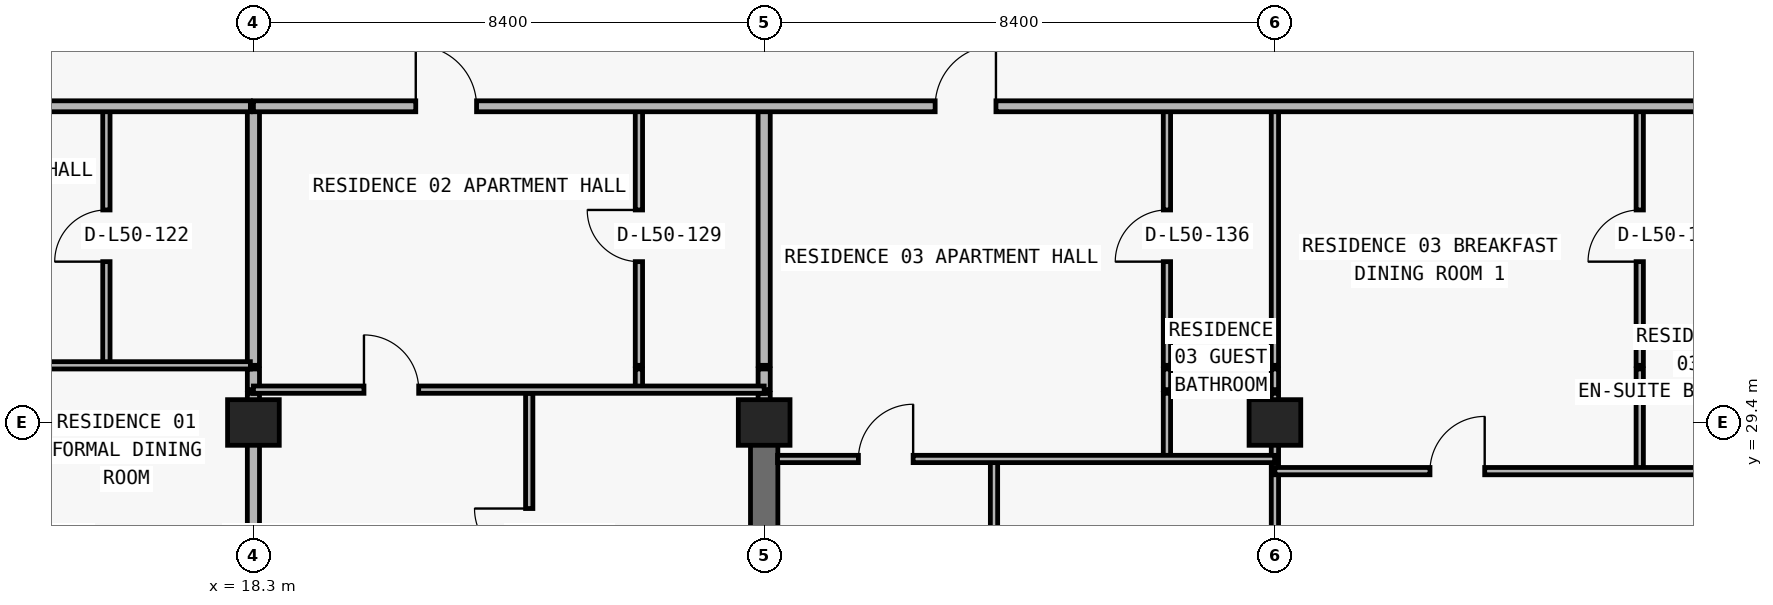
"""IFC4 building model, lengths in metres.
Left out: names, types, materials, properties, quantities, classifications, styles, units other than length and angle.
Written with IfcOpenShell. Run it as: python <this file> out.ifc"""

import sys

from ifc_helpers import new_model, si_unit, direction, frame, frame_2d, origin, origin_2d, place, context, subcontext, project, spatial, rectangle, extrude, element, fill, save


model = new_model("IFC4")
c1 = context("Model", 3, precision=1e-05, world=origin(), true_north=direction((0.0, 1.0)))
c2 = subcontext(c1, "Body", "Model", "MODEL_VIEW")
j1 = project(units=[si_unit("LENGTHUNIT", "METRE"), si_unit("PLANEANGLEUNIT", "RADIAN")], contexts=[c1])
p1 = place(None, origin())
s1 = spatial("IfcSite", under=j1, at=p1, CompositionType="ELEMENT")
p2 = place(p1, origin())
s2 = spatial("IfcBuilding", under=s1, at=p2, CompositionType="ELEMENT")
p3 = place(p2, frame((0.0, 0.0, 180.3)))
s3 = spatial("IfcBuildingStorey", under=s2, at=p3, CompositionType="ELEMENT", Elevation=180.3)
for number, where, z_axis, x_axis in (
    (1, (18.3, 29.4, 0.0), (0.0, 0.0, 1.0), (1.0, 0.0, 0.0)),
    (2, (26.7, 29.4, 0.0), (0.0, 0.0, 1.0), (1.0, 0.0, 0.0)),
    (3, (35.1, 29.4, 0.0), (0.0, 0.0, 1.0), (1.0, 0.0, 0.0)),
):
    element("IfcColumn", number, at=place(p3, frame(where, z_axis=z_axis, x_axis=x_axis)), inside=s3, PredefinedType="COLUMN", context=c2, shape_type="SweptSolid", body=[
        extrude(rectangle(XDim=0.85, YDim=0.75, at=origin_2d()), origin(), (0.0, 0.0, 1.0), 3.0),
    ])
p4 = place(p3, frame((26.7, 20.8, 0.0), z_axis=(0.0, 0.0, 1.0), x_axis=(0.0, 1.0, 0.0)))
e4 = element("IfcWall", 4, at=p4, inside=s3, PredefinedType="SHEAR", context=c2, shape_type="SweptSolid", body=[
    extrude(rectangle(XDim=8.6, YDim=0.45, at=frame_2d((4.3, 0.0))), origin(), (0.0, 0.0, 1.0), 3.0),
])
p5 = place(p3, frame((15.882, 30.34, 0.0), z_axis=(0.0, 0.0, 1.0), x_axis=(0.0, 1.0, 0.0)))
e5 = element("IfcWall", 5, at=p5, inside=s3, PredefinedType="PARTITIONING", context=c2, shape_type="SweptSolid", body=[
    extrude(rectangle(XDim=4.26, YDim=0.12, at=frame_2d((2.13, 0.0))), origin(), (0.0, 0.0, 1.0), 2.675),
])
p6 = place(p5, frame((1.705, 0.0, 0.0)))
e6 = element("IfcOpeningElement", 6, at=p6, cuts=e5, PredefinedType="OPENING", context=c2, shape_type="SweptSolid", body=[
    extrude(rectangle(XDim=0.85, YDim=2.1, at=frame_2d((0.425, 1.05))), frame((0.0, 0.07, 0.0), z_axis=(0.0, -1.0, 0.0), x_axis=(1.0, 0.0, 0.0)), (0.0, 0.0, 1.0), 0.14),
])
p7 = place(p3, frame((18.3, 25.19, 0.0), z_axis=(0.0, 0.0, 1.0), x_axis=(0.0, 1.0, 0.0)))
e7 = element("IfcWall", 7, at=p7, inside=s3, PredefinedType="PARTITIONING", context=c2, shape_type="SweptSolid", body=[
    extrude(rectangle(XDim=4.69, YDim=0.2, at=frame_2d((2.345, 0.0))), origin(), (0.0, 0.0, 1.0), 2.213),
])
p8 = place(p3, frame((18.3, 29.94, 0.0), z_axis=(0.0, 0.0, 1.0), x_axis=(0.0, 1.0, 0.0)))
e8 = element("IfcWall", 8, at=p8, inside=s3, PredefinedType="PARTITIONING", context=c2, shape_type="SweptSolid", body=[
    extrude(rectangle(XDim=0.34, YDim=0.2, at=frame_2d((0.17, 0.0))), origin(), (0.0, 0.0, 1.0), 2.213),
])
p9 = place(p3, frame((18.3, 30.34, 0.0), z_axis=(0.0, 0.0, 1.0), x_axis=(0.0, 1.0, 0.0)))
e9 = element("IfcWall", 9, at=p9, inside=s3, PredefinedType="PARTITIONING", context=c2, shape_type="SweptSolid", body=[
    extrude(rectangle(XDim=4.26, YDim=0.2, at=frame_2d((2.13, 0.0))), origin(), (0.0, 0.0, 1.0), 2.213),
])
p10 = place(p3, frame((22.836, 25.19, 0.0), z_axis=(0.0, 0.0, 1.0), x_axis=(0.0, 1.0, 0.0)))
e10 = element("IfcWall", 10, at=p10, inside=s3, PredefinedType="PARTITIONING", context=c2, shape_type="SweptSolid", body=[
    extrude(rectangle(XDim=4.69, YDim=0.12, at=frame_2d((2.345, 0.0))), origin(), (0.0, 0.0, 1.0), 3.0),
])
p11 = place(p10, frame((1.895, 0.0, 0.0)))
e11 = element("IfcOpeningElement", 11, at=p11, cuts=e10, PredefinedType="OPENING", context=c2, shape_type="SweptSolid", body=[
    extrude(rectangle(XDim=0.9, YDim=2.15, at=frame_2d((0.45, 1.075))), frame((0.0, 0.07, 0.0), z_axis=(0.0, -1.0, 0.0), x_axis=(1.0, 0.0, 0.0)), (0.0, 0.0, 1.0), 0.14),
])
p12 = place(p3, frame((24.64, 29.94, 0.0), z_axis=(0.0, 0.0, 1.0), x_axis=(0.0, 1.0, 0.0)))
e12 = element("IfcWall", 12, at=p12, inside=s3, PredefinedType="PARTITIONING", context=c2, shape_type="SweptSolid", body=[
    extrude(rectangle(XDim=0.34, YDim=0.12, at=frame_2d((0.17, 0.0))), origin(), (0.0, 0.0, 1.0), 3.0),
])
p13 = place(p3, frame((24.64, 30.34, 0.0), z_axis=(0.0, 0.0, 1.0), x_axis=(0.0, 1.0, 0.0)))
e13 = element("IfcWall", 13, at=p13, inside=s3, PredefinedType="PARTITIONING", context=c2, shape_type="SweptSolid", body=[
    extrude(rectangle(XDim=4.26, YDim=0.12, at=frame_2d((2.13, 0.0))), origin(), (0.0, 0.0, 1.0), 3.0),
])
p14 = place(p13, frame((1.705, 0.0, 0.0)))
e14 = element("IfcOpeningElement", 14, at=p14, cuts=e13, PredefinedType="OPENING", context=c2, shape_type="SweptSolid", body=[
    extrude(rectangle(XDim=0.85, YDim=2.1, at=frame_2d((0.425, 1.05))), frame((0.0, 0.07, 0.0), z_axis=(0.0, -1.0, 0.0), x_axis=(1.0, 0.0, 0.0)), (0.0, 0.0, 1.0), 0.14),
])
p15 = place(p3, frame((26.7, 29.405, 0.0), z_axis=(0.0, 0.0, 1.0), x_axis=(0.0, 1.0, 0.0)))
e15 = element("IfcWall", 15, at=p15, inside=s3, PredefinedType="PARTITIONING", context=c2, shape_type="SweptSolid", body=[
    extrude(rectangle(XDim=0.475, YDim=0.2, at=frame_2d((0.237, 0.0))), origin(), (0.0, 0.0, 1.0), 2.285),
])
p16 = place(p3, frame((26.7, 29.94, 0.0), z_axis=(0.0, 0.0, 1.0), x_axis=(0.0, 1.0, 0.0)))
e16 = element("IfcWall", 16, at=p16, inside=s3, PredefinedType="PARTITIONING", context=c2, shape_type="SweptSolid", body=[
    extrude(rectangle(XDim=0.34, YDim=0.2, at=frame_2d((0.17, 0.0))), origin(), (0.0, 0.0, 1.0), 2.285),
])
p17 = place(p3, frame((26.7, 30.34, 0.0), z_axis=(0.0, 0.0, 1.0), x_axis=(0.0, 1.0, 0.0)))
e17 = element("IfcWall", 17, at=p17, inside=s3, PredefinedType="PARTITIONING", context=c2, shape_type="SweptSolid", body=[
    extrude(rectangle(XDim=4.26, YDim=0.2, at=frame_2d((2.13, 0.0))), origin(), (0.0, 0.0, 1.0), 2.285),
])
p18 = place(p3, frame((30.48, 25.19, 0.0), z_axis=(0.0, 0.0, 1.0), x_axis=(0.0, 1.0, 0.0)))
e18 = element("IfcWall", 18, at=p18, inside=s3, PredefinedType="PARTITIONING", context=c2, shape_type="SweptSolid", body=[
    extrude(rectangle(XDim=3.61, YDim=0.12, at=frame_2d((1.805, 0.0))), origin(), (0.0, 0.0, 1.0), 3.0),
])
p19 = place(p18, frame((1.355, 0.0, 0.0)))
e19 = element("IfcOpeningElement", 19, at=p19, cuts=e18, PredefinedType="OPENING", context=c2, shape_type="SweptSolid", body=[
    extrude(rectangle(XDim=0.9, YDim=2.15, at=frame_2d((0.45, 1.075))), frame((0.0, 0.07, 0.0), z_axis=(0.0, -1.0, 0.0), x_axis=(1.0, 0.0, 0.0)), (0.0, 0.0, 1.0), 0.14),
])
p20 = place(p3, frame((33.324, 28.8, 0.0), z_axis=(0.0, 0.0, 1.0), x_axis=(0.0, 1.0, 0.0)))
e20 = element("IfcWall", 20, at=p20, inside=s3, PredefinedType="PARTITIONING", context=c2, shape_type="SweptSolid", body=[
    extrude(rectangle(XDim=1.08, YDim=0.12, at=frame_2d((0.54, 0.0))), origin(), (0.0, 0.0, 1.0), 3.0),
])
p21 = place(p3, frame((33.324, 29.94, 0.0), z_axis=(0.0, 0.0, 1.0), x_axis=(0.0, 1.0, 0.0)))
e21 = element("IfcWall", 21, at=p21, inside=s3, PredefinedType="PARTITIONING", context=c2, shape_type="SweptSolid", body=[
    extrude(rectangle(XDim=0.34, YDim=0.12, at=frame_2d((0.17, 0.0))), origin(), (0.0, 0.0, 1.0), 3.0),
])
p22 = place(p3, frame((33.324, 30.34, 0.0), z_axis=(0.0, 0.0, 1.0), x_axis=(0.0, 1.0, 0.0)))
e22 = element("IfcWall", 22, at=p22, inside=s3, PredefinedType="PARTITIONING", context=c2, shape_type="SweptSolid", body=[
    extrude(rectangle(XDim=4.26, YDim=0.12, at=frame_2d((2.13, 0.0))), origin(), (0.0, 0.0, 1.0), 3.0),
])
p23 = place(p22, frame((1.705, 0.0, 0.0)))
e23 = element("IfcOpeningElement", 23, at=p23, cuts=e22, PredefinedType="OPENING", context=c2, shape_type="SweptSolid", body=[
    extrude(rectangle(XDim=0.85, YDim=2.1, at=frame_2d((0.425, 1.05))), frame((0.0, 0.07, 0.0), z_axis=(0.0, -1.0, 0.0), x_axis=(1.0, 0.0, 0.0)), (0.0, 0.0, 1.0), 0.14),
])
p24 = place(p3, frame((35.1, 25.19, 0.0), z_axis=(0.0, 0.0, 1.0), x_axis=(0.0, 1.0, 0.0)))
e24 = element("IfcWall", 24, at=p24, inside=s3, PredefinedType="PARTITIONING", context=c2, shape_type="SweptSolid", body=[
    extrude(rectangle(XDim=4.69, YDim=0.12, at=frame_2d((2.345, 0.0))), origin(), (0.0, 0.0, 1.0), 2.213),
])
p25 = place(p24, frame((1.255, 0.0, 0.0)))
e25 = element("IfcOpeningElement", 25, at=p25, cuts=e24, PredefinedType="OPENING", context=c2, shape_type="SweptSolid", body=[
    extrude(rectangle(XDim=0.9, YDim=2.15, at=frame_2d((0.45, 1.075))), frame((0.0, 0.07, 0.0), z_axis=(0.0, -1.0, 0.0), x_axis=(1.0, 0.0, 0.0)), (0.0, 0.0, 1.0), 0.14),
])
p26 = place(p3, frame((35.1, 29.94, 0.0), z_axis=(0.0, 0.0, 1.0), x_axis=(0.0, 1.0, 0.0)))
e26 = element("IfcWall", 26, at=p26, inside=s3, PredefinedType="PARTITIONING", context=c2, shape_type="SweptSolid", body=[
    extrude(rectangle(XDim=0.34, YDim=0.12, at=frame_2d((0.17, 0.0))), origin(), (0.0, 0.0, 1.0), 2.213),
])
p27 = place(p3, frame((35.1, 30.34, 0.0), z_axis=(0.0, 0.0, 1.0), x_axis=(0.0, 1.0, 0.0)))
e27 = element("IfcWall", 27, at=p27, inside=s3, PredefinedType="PARTITIONING", context=c2, shape_type="SweptSolid", body=[
    extrude(rectangle(XDim=4.26, YDim=0.12, at=frame_2d((2.13, 0.0))), origin(), (0.0, 0.0, 1.0), 2.213),
])
p28 = place(p3, frame((41.1, 28.6, 0.0), z_axis=(0.0, 0.0, 1.0), x_axis=(0.0, 1.0, 0.0)))
e28 = element("IfcWall", 28, at=p28, inside=s3, PredefinedType="PARTITIONING", context=c2, shape_type="SweptSolid", body=[
    extrude(rectangle(XDim=1.28, YDim=0.12, at=frame_2d((0.64, 0.0))), origin(), (0.0, 0.0, 1.0), 3.0),
])
p29 = place(p3, frame((41.1, 29.94, 0.0), z_axis=(0.0, 0.0, 1.0), x_axis=(0.0, 1.0, 0.0)))
e29 = element("IfcWall", 29, at=p29, inside=s3, PredefinedType="PARTITIONING", context=c2, shape_type="SweptSolid", body=[
    extrude(rectangle(XDim=0.34, YDim=0.12, at=frame_2d((0.17, 0.0))), origin(), (0.0, 0.0, 1.0), 3.0),
])
p30 = place(p3, frame((41.1, 30.34, 0.0), z_axis=(0.0, 0.0, 1.0), x_axis=(0.0, 1.0, 0.0)))
e30 = element("IfcWall", 30, at=p30, inside=s3, PredefinedType="PARTITIONING", context=c2, shape_type="SweptSolid", body=[
    extrude(rectangle(XDim=4.26, YDim=0.12, at=frame_2d((2.13, 0.0))), origin(), (0.0, 0.0, 1.0), 3.0),
])
p31 = place(p30, frame((1.705, 0.0, 0.0)))
e31 = element("IfcOpeningElement", 31, at=p31, cuts=e30, PredefinedType="OPENING", context=c2, shape_type="SweptSolid", body=[
    extrude(rectangle(XDim=0.85, YDim=2.1, at=frame_2d((0.425, 1.05))), frame((0.0, 0.07, 0.0), z_axis=(0.0, -1.0, 0.0), x_axis=(1.0, 0.0, 0.0)), (0.0, 0.0, 1.0), 0.14),
])
p32 = place(p3, frame((35.1, 28.6, 0.0), z_axis=(0.0, 0.0, 1.0), x_axis=(1.0, 0.0, 0.0)))
e32 = element("IfcWall", 32, at=p32, inside=s3, PredefinedType="PARTITIONING", context=c2, shape_type="SweptSolid", body=[
    extrude(rectangle(XDim=7.6, YDim=0.12, at=frame_2d((3.8, 0.0))), origin(), (0.0, 0.0, 1.0), 3.0),
])
p33 = place(p32, frame((2.55, 0.0, 0.0)))
e33 = element("IfcOpeningElement", 33, at=p33, cuts=e32, PredefinedType="OPENING", context=c2, shape_type="SweptSolid", body=[
    extrude(rectangle(XDim=0.9, YDim=2.15, at=frame_2d((0.45, 1.075))), frame((0.0, 0.07, 0.0), z_axis=(0.0, -1.0, 0.0), x_axis=(1.0, 0.0, 0.0)), (0.0, 0.0, 1.0), 0.14),
])
p34 = place(p3, frame((26.92, 28.8, 0.0), z_axis=(0.0, 0.0, 1.0), x_axis=(1.0, 0.0, 0.0)))
e34 = element("IfcWall", 34, at=p34, inside=s3, PredefinedType="PARTITIONING", context=c2, shape_type="SweptSolid", body=[
    extrude(rectangle(XDim=8.175, YDim=0.12, at=frame_2d((4.087, 0.0))), origin(), (0.0, 0.0, 1.0), 3.0),
])
p35 = place(p34, frame((1.33, 0.0, 0.0)))
e35 = element("IfcOpeningElement", 35, at=p35, cuts=e34, PredefinedType="OPENING", context=c2, shape_type="SweptSolid", body=[
    extrude(rectangle(XDim=0.9, YDim=2.15, at=frame_2d((0.45, 1.075))), frame((0.0, 0.07, 0.0), z_axis=(0.0, -1.0, 0.0), x_axis=(1.0, 0.0, 0.0)), (0.0, 0.0, 1.0), 0.14),
])
p36 = place(p3, frame((18.3, 29.94, 0.0), z_axis=(0.0, 0.0, 1.0), x_axis=(1.0, 0.0, 0.0)))
e36 = element("IfcWall", 36, at=p36, inside=s3, PredefinedType="PARTITIONING", context=c2, shape_type="SweptSolid", body=[
    extrude(rectangle(XDim=8.4, YDim=0.12, at=frame_2d((4.2, 0.0))), origin(), (0.0, 0.0, 1.0), 3.0),
])
p37 = place(p36, frame((1.818, 0.0, 0.0)))
e37 = element("IfcOpeningElement", 37, at=p37, cuts=e36, PredefinedType="OPENING", context=c2, shape_type="SweptSolid", body=[
    extrude(rectangle(XDim=0.9, YDim=2.15, at=frame_2d((0.45, 1.075))), frame((0.0, 0.07, 0.0), z_axis=(0.0, -1.0, 0.0), x_axis=(1.0, 0.0, 0.0)), (0.0, 0.0, 1.0), 0.14),
])
p38 = place(p3, frame((10.1, 30.34, 0.0), z_axis=(0.0, 0.0, 1.0), x_axis=(1.0, 0.0, 0.0)))
e38 = element("IfcWall", 38, at=p38, inside=s3, PredefinedType="PARTITIONING", context=c2, shape_type="SweptSolid", body=[
    extrude(rectangle(XDim=8.15, YDim=0.12, at=frame_2d((4.075, 0.0))), origin(), (0.0, 0.0, 1.0), 3.0),
])
p39 = place(p38, frame((1.639, 0.0, 0.0)))
e39 = element("IfcOpeningElement", 39, at=p39, cuts=e38, PredefinedType="OPENING", context=c2, shape_type="SweptSolid", body=[
    extrude(rectangle(XDim=0.9, YDim=2.15, at=frame_2d((0.45, 1.075))), frame((0.0, 0.07, 0.0), z_axis=(0.0, -1.0, 0.0), x_axis=(1.0, 0.0, 0.0)), (0.0, 0.0, 1.0), 0.14),
])
p40 = place(p3, frame((10.105, 34.6, 0.0), z_axis=(0.0, 0.0, 1.0), x_axis=(1.0, 0.0, 0.0)))
e40 = element("IfcWall", 40, at=p40, inside=s3, PredefinedType="PARTITIONING", context=c2, shape_type="SweptSolid", body=[
    extrude(rectangle(XDim=8.145, YDim=0.18, at=frame_2d((4.073, 0.0))), origin(), (0.0, 0.0, 1.0), 3.0),
])
p41 = place(p40, frame((2.388, 0.0, 0.0)))
e41 = element("IfcOpeningElement", 41, at=p41, cuts=e40, PredefinedType="OPENING", context=c2, shape_type="SweptSolid", body=[
    extrude(rectangle(XDim=1.0, YDim=2.2, at=frame_2d((0.5, 1.1))), frame((0.0, 0.1, 0.0), z_axis=(0.0, -1.0, 0.0), x_axis=(1.0, 0.0, 0.0)), (0.0, 0.0, 1.0), 0.2),
])
p42 = place(p3, frame((18.3, 34.6, 0.0), z_axis=(0.0, 0.0, 1.0), x_axis=(1.0, 0.0, 0.0)))
e42 = element("IfcWall", 42, at=p42, inside=s3, PredefinedType="PARTITIONING", context=c2, shape_type="SweptSolid", body=[
    extrude(rectangle(XDim=41.2, YDim=0.18, at=frame_2d((20.6, 0.0))), origin(), (0.0, 0.0, 1.0), 3.0),
])
p43 = place(p42, frame((2.67, 0.0, 0.0)))
e43 = element("IfcOpeningElement", 43, at=p43, cuts=e42, PredefinedType="OPENING", context=c2, shape_type="SweptSolid", body=[
    extrude(rectangle(XDim=1.0, YDim=2.2, at=frame_2d((0.5, 1.1))), frame((0.0, 0.1, 0.0), z_axis=(0.0, -1.0, 0.0), x_axis=(1.0, 0.0, 0.0)), (0.0, 0.0, 1.0), 0.2),
])
p44 = place(p42, frame((11.212, 0.0, 0.0)))
e44 = element("IfcOpeningElement", 44, at=p44, cuts=e42, PredefinedType="OPENING", context=c2, shape_type="SweptSolid", body=[
    extrude(rectangle(XDim=1.0, YDim=2.2, at=frame_2d((0.5, 1.1))), frame((0.0, 0.1, 0.0), z_axis=(0.0, -1.0, 0.0), x_axis=(1.0, 0.0, 0.0)), (0.0, 0.0, 1.0), 0.2),
])
p45 = place(p42, frame((35.483, 0.0, 0.0)))
e45 = element("IfcOpeningElement", 45, at=p45, cuts=e42, PredefinedType="OPENING", context=c2, shape_type="SweptSolid", body=[
    extrude(rectangle(XDim=1.0, YDim=2.2, at=frame_2d((0.5, 1.1))), frame((0.0, 0.1, 0.0), z_axis=(0.0, -1.0, 0.0), x_axis=(1.0, 0.0, 0.0)), (0.0, 0.0, 1.0), 0.2),
])
p46 = place(p6, origin())
e46 = element("IfcDoor", 46, at=p46, inside=s3, OperationType="SINGLE_SWING_LEFT", PredefinedType="DOOR", context=c2, shape_type="SweptSolid", body=[
    extrude(rectangle(XDim=0.85, YDim=2.1, at=frame_2d((0.425, 1.05))), frame((0.0, 0.025, 0.0), z_axis=(0.0, -1.0, 0.0), x_axis=(1.0, 0.0, 0.0)), (0.0, 0.0, 1.0), 0.05),
])
fill(e6, e46)
p47 = place(p43, origin())
e47 = element("IfcDoor", 47, at=p47, inside=s3, OperationType="SINGLE_SWING_LEFT", PredefinedType="DOOR", context=c2, shape_type="SweptSolid", body=[
    extrude(rectangle(XDim=1.0, YDim=2.2, at=frame_2d((0.5, 1.1))), frame((0.0, 0.025, 0.0), z_axis=(0.0, -1.0, 0.0), x_axis=(1.0, 0.0, 0.0)), (0.0, 0.0, 1.0), 0.05),
])
fill(e43, e47)
p48 = place(p14, origin())
e48 = element("IfcDoor", 48, at=p48, inside=s3, OperationType="SINGLE_SWING_RIGHT", PredefinedType="DOOR", context=c2, shape_type="SweptSolid", body=[
    extrude(rectangle(XDim=0.85, YDim=2.1, at=frame_2d((0.425, 1.05))), frame((0.0, 0.025, 0.0), z_axis=(0.0, -1.0, 0.0), x_axis=(1.0, 0.0, 0.0)), (0.0, 0.0, 1.0), 0.05),
])
fill(e14, e48)
p49 = place(p37, origin())
e49 = element("IfcDoor", 49, at=p49, inside=s3, OperationType="SINGLE_SWING_LEFT", PredefinedType="DOOR", context=c2, shape_type="SweptSolid", body=[
    extrude(rectangle(XDim=0.9, YDim=2.15, at=frame_2d((0.45, 1.075))), frame((0.0, 0.025, 0.0), z_axis=(0.0, -1.0, 0.0), x_axis=(1.0, 0.0, 0.0)), (0.0, 0.0, 1.0), 0.05),
])
fill(e37, e49)
p50 = place(p11, origin())
e50 = element("IfcDoor", 50, at=p50, inside=s3, OperationType="SINGLE_SWING_RIGHT", PredefinedType="DOOR", context=c2, shape_type="SweptSolid", body=[
    extrude(rectangle(XDim=0.9, YDim=2.15, at=frame_2d((0.45, 1.075))), frame((0.0, 0.025, 0.0), z_axis=(0.0, -1.0, 0.0), x_axis=(1.0, 0.0, 0.0)), (0.0, 0.0, 1.0), 0.05),
])
fill(e11, e50)
p51 = place(p44, origin())
e51 = element("IfcDoor", 51, at=p51, inside=s3, OperationType="SINGLE_SWING_RIGHT", PredefinedType="DOOR", context=c2, shape_type="SweptSolid", body=[
    extrude(rectangle(XDim=1.0, YDim=2.2, at=frame_2d((0.5, 1.1))), frame((0.0, 0.025, 0.0), z_axis=(0.0, -1.0, 0.0), x_axis=(1.0, 0.0, 0.0)), (0.0, 0.0, 1.0), 0.05),
])
fill(e44, e51)
p52 = place(p23, origin())
e52 = element("IfcDoor", 52, at=p52, inside=s3, OperationType="SINGLE_SWING_LEFT", PredefinedType="DOOR", context=c2, shape_type="SweptSolid", body=[
    extrude(rectangle(XDim=0.85, YDim=2.1, at=frame_2d((0.425, 1.05))), frame((0.0, 0.025, 0.0), z_axis=(0.0, -1.0, 0.0), x_axis=(1.0, 0.0, 0.0)), (0.0, 0.0, 1.0), 0.05),
])
fill(e23, e52)
p53 = place(p35, origin())
e53 = element("IfcDoor", 53, at=p53, inside=s3, OperationType="SINGLE_SWING_RIGHT", PredefinedType="DOOR", context=c2, shape_type="SweptSolid", body=[
    extrude(rectangle(XDim=0.9, YDim=2.15, at=frame_2d((0.45, 1.075))), frame((0.0, 0.025, 0.0), z_axis=(0.0, -1.0, 0.0), x_axis=(1.0, 0.0, 0.0)), (0.0, 0.0, 1.0), 0.05),
])
fill(e35, e53)
p54 = place(p33, origin())
e54 = element("IfcDoor", 54, at=p54, inside=s3, OperationType="SINGLE_SWING_RIGHT", PredefinedType="DOOR", context=c2, shape_type="SweptSolid", body=[
    extrude(rectangle(XDim=0.9, YDim=2.15, at=frame_2d((0.45, 1.075))), frame((0.0, 0.025, 0.0), z_axis=(0.0, -1.0, 0.0), x_axis=(1.0, 0.0, 0.0)), (0.0, 0.0, 1.0), 0.05),
])
fill(e33, e54)
p55 = place(p31, origin())
e55 = element("IfcDoor", 55, at=p55, inside=s3, OperationType="SINGLE_SWING_LEFT", PredefinedType="DOOR", context=c2, shape_type="SweptSolid", body=[
    extrude(rectangle(XDim=0.85, YDim=2.1, at=frame_2d((0.425, 1.05))), frame((0.0, 0.025, 0.0), z_axis=(0.0, -1.0, 0.0), x_axis=(1.0, 0.0, 0.0)), (0.0, 0.0, 1.0), 0.05),
])
fill(e31, e55)
save(model, sys.argv[1])
